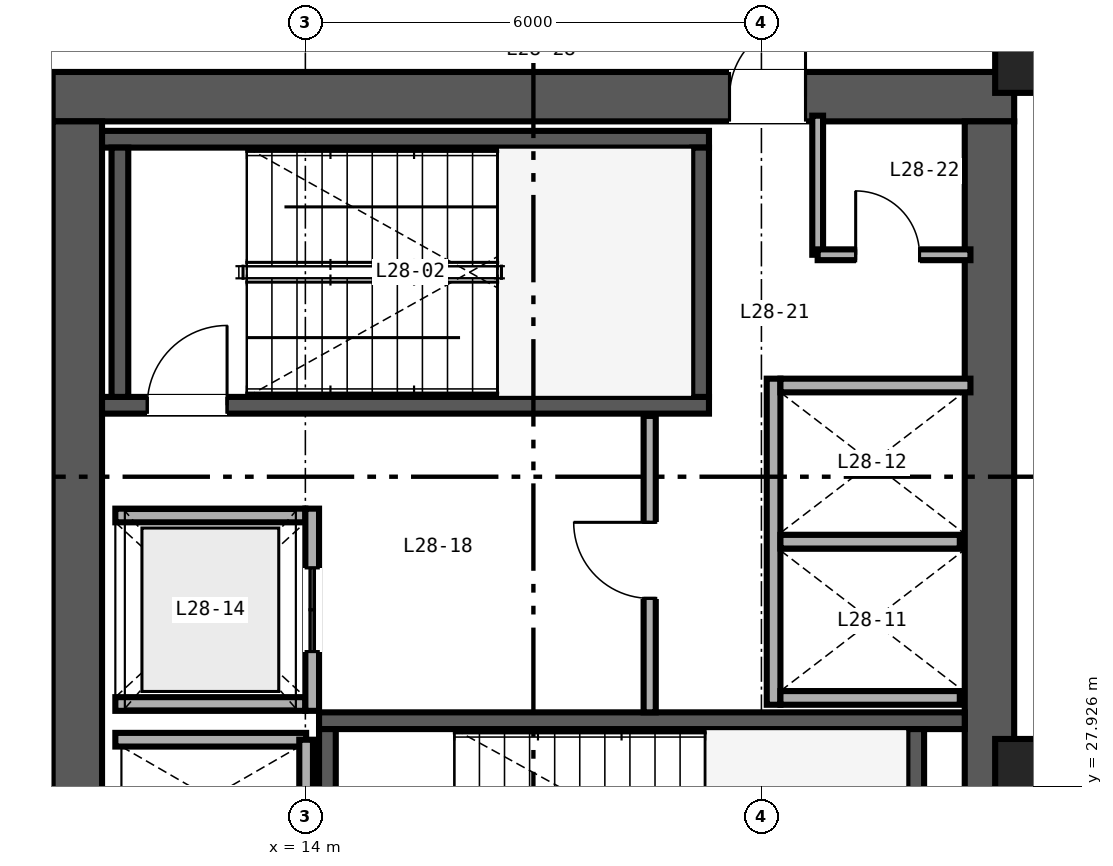
"""IFC4 building model, lengths in metres.
Left out: names, types, materials, properties, quantities, classifications, styles, units other than length and angle.
Written with IfcOpenShell. Run it as: python <this file> out.ifc"""

import sys

from ifc_helpers import new_model, si_unit, direction, frame, frame_2d, origin, origin_2d, place, context, subcontext, project, spatial, rectangle, hollow_rectangle, extrude, source, transform, mapped, element, fill, save


model = new_model("IFC4")
c1 = context("Model", 3, precision=1e-05, world=origin(), true_north=direction((0.0, 1.0)))
c2 = subcontext(c1, "Body", "Model", "MODEL_VIEW")
j1 = project(units=[si_unit("LENGTHUNIT", "METRE"), si_unit("PLANEANGLEUNIT", "RADIAN")], contexts=[c1])
p1 = place(None, origin())
s1 = spatial("IfcSite", under=j1, at=p1, CompositionType="ELEMENT")
p2 = place(p1, origin())
s2 = spatial("IfcBuilding", under=s1, at=p2, CompositionType="ELEMENT")
p3 = place(p2, frame((0.0, 0.0, 115.2)))
s3 = spatial("IfcBuildingStorey", under=s2, at=p3, CompositionType="ELEMENT", Elevation=115.2)
p4 = place(p3, frame((10.675, 37.0, 0.0), z_axis=(0.0, 0.0, 1.0), x_axis=(1.0, 0.0, 0.0)))
e1 = element("IfcWall", 1, at=p4, inside=s3, PredefinedType="SHEAR", context=c2, shape_type="SweptSolid", body=[
    extrude(rectangle(XDim=12.65, YDim=0.65, at=frame_2d((6.325, 0.0))), origin(), (0.0, 0.0, 1.0), 3.36),
])
p5 = place(p4, frame((8.905, 0.0, 0.0)))
e2 = element("IfcOpeningElement", 2, at=p5, cuts=e1, PredefinedType="OPENING", context=c2, shape_type="SweptSolid", body=[
    extrude(rectangle(XDim=1.0, YDim=2.15, at=frame_2d((0.5, 1.075))), frame((0.0, 0.335, 0.0), z_axis=(0.0, -1.0, 0.0), x_axis=(1.0, 0.0, 0.0)), (0.0, 0.0, 1.0), 0.67),
])
for number, where, z_axis, x_axis in (
    (3, (11.0, 15.325, 0.0), (0.0, 0.0, 1.0), (0.0, 1.0, 0.0)),
    (4, (23.0, 15.325, 0.0), (0.0, 0.0, 1.0), (0.0, 1.0, 0.0)),
):
    element("IfcWall", number, at=place(p3, frame(where, z_axis=z_axis, x_axis=x_axis)), inside=s3, PredefinedType="SHEAR", context=c2, shape_type="SweptSolid", body=[
        extrude(rectangle(XDim=21.35, YDim=0.65, at=frame_2d((10.675, 0.0))), origin(), (0.0, 0.0, 1.0), 3.36),
    ])
p6 = place(p3, frame((11.325, 32.94, 0.0), z_axis=(0.0, 0.0, 1.0), x_axis=(1.0, 0.0, 0.0)))
e5 = element("IfcWall", 5, at=p6, inside=s3, PredefinedType="SHEAR", context=c2, shape_type="SweptSolid", body=[
    extrude(rectangle(XDim=7.985, YDim=0.22, at=frame_2d((3.993, 0.0))), origin(), (0.0, 0.0, 1.0), 3.4),
])
p7 = place(p6, frame((0.595, 0.0, 0.0)))
e6 = element("IfcOpeningElement", 6, at=p7, cuts=e5, PredefinedType="OPENING", context=c2, shape_type="SweptSolid", body=[
    extrude(rectangle(XDim=1.05, YDim=2.15, at=frame_2d((0.525, 1.075))), frame((0.0, 0.12, 0.0), z_axis=(0.0, -1.0, 0.0), x_axis=(1.0, 0.0, 0.0)), (0.0, 0.0, 1.0), 0.24),
])
p8 = place(p3, frame((11.325, 36.44, 0.0), z_axis=(0.0, 0.0, 1.0), x_axis=(1.0, 0.0, 0.0)))
e7 = element("IfcWall", 7, at=p8, inside=s3, PredefinedType="SHEAR", context=c2, shape_type="SweptSolid", body=[
    extrude(rectangle(XDim=7.985, YDim=0.22, at=frame_2d((3.993, 0.0))), origin(), (0.0, 0.0, 1.0), 3.4),
])
for number, where, z_axis, x_axis in (
    (8, (11.56, 33.05, 0.0), (0.0, 0.0, 1.0), (0.0, 1.0, 0.0)),
    (9, (19.2, 33.05, 0.0), (0.0, 0.0, 1.0), (0.0, 1.0, 0.0)),
):
    element("IfcWall", number, at=place(p3, frame(where, z_axis=z_axis, x_axis=x_axis)), inside=s3, PredefinedType="SHEAR", context=c2, shape_type="SweptSolid", body=[
        extrude(rectangle(XDim=3.28, YDim=0.22, at=frame_2d((1.64, 0.0))), origin(), (0.0, 0.0, 1.0), 3.4),
    ])
p9 = place(p3, frame((14.18, 28.79, 0.0), z_axis=(0.0, 0.0, 1.0), x_axis=(1.0, 0.0, 0.0)))
e10 = element("IfcWall", 10, at=p9, inside=s3, PredefinedType="SHEAR", context=c2, shape_type="SweptSolid", body=[
    extrude(rectangle(XDim=8.495, YDim=0.22, at=frame_2d((4.248, 0.0))), origin(), (0.0, 0.0, 1.0), 3.4),
])
for number, where, z_axis, x_axis in (
    (11, (14.29, 25.4, 0.0), (0.0, 0.0, 1.0), (0.0, 1.0, 0.0)),
    (12, (22.03, 25.4, 0.0), (0.0, 0.0, 1.0), (0.0, 1.0, 0.0)),
):
    element("IfcWall", number, at=place(p3, frame(where, z_axis=z_axis, x_axis=x_axis)), inside=s3, PredefinedType="SHEAR", context=c2, shape_type="SweptSolid", body=[
        extrude(rectangle(XDim=3.28, YDim=0.22, at=frame_2d((1.64, 0.0))), origin(), (0.0, 0.0, 1.0), 3.4),
    ])
m1 = source(origin(), c2, "Body", "SweptSolid", [
    extrude(hollow_rectangle(XDim=0.85, YDim=0.8, WallThickness=0.032, at=origin_2d()), origin(), (0.0, 0.0, 1.0), 3.36),
])
for number, where, z_axis, x_axis in (
    (13, (23.5, 28.15, 0.0), (0.0, 0.0, 1.0), (1.0, 0.0, 0.0)),
    (14, (23.5, 37.45, 0.0), (0.0, 0.0, 1.0), (1.0, 0.0, 0.0)),
):
    element("IfcColumn", number, at=place(p3, frame(where, z_axis=z_axis, x_axis=x_axis)), inside=s3, PredefinedType="COLUMN", context=c2, shape_type="MappedRepresentation", body=[
        mapped(m1, transform((0.0, 0.0, 0.0), scale=1.0)),
    ])
p10 = place(p3, frame((20.16, 29.0, 0.0), z_axis=(0.0, 0.0, 1.0), x_axis=(0.0, 1.0, 0.0)))
e15 = element("IfcWall", 15, at=p10, inside=s3, PredefinedType="SOLIDWALL", context=c2, shape_type="SweptSolid", body=[
    extrude(rectangle(XDim=4.29, YDim=0.18, at=frame_2d((2.145, 0.0))), origin(), (0.0, 0.0, 1.0), 3.36),
])
p11 = place(p3, frame((20.25, 29.09, 0.0), z_axis=(0.0, 0.0, 1.0), x_axis=(1.0, 0.0, 0.0)))
e16 = element("IfcWall", 16, at=p11, inside=s3, PredefinedType="SOLIDWALL", context=c2, shape_type="SweptSolid", body=[
    extrude(rectangle(XDim=2.36, YDim=0.18, at=frame_2d((1.18, 0.0))), origin(), (0.0, 0.0, 1.0), 3.36),
])
p12 = place(p3, frame((20.25, 33.2, 0.0), z_axis=(0.0, 0.0, 1.0), x_axis=(1.0, 0.0, 0.0)))
e17 = element("IfcWall", 17, at=p12, inside=s3, PredefinedType="SOLIDWALL", context=c2, shape_type="SweptSolid", body=[
    extrude(rectangle(XDim=2.5, YDim=0.18, at=frame_2d((1.25, 0.0))), origin(), (0.0, 0.0, 1.0), 3.36),
])
p13 = place(p3, frame((20.25, 31.145, 0.0), z_axis=(0.0, 0.0, 1.0), x_axis=(1.0, 0.0, 0.0)))
e18 = element("IfcWall", 18, at=p13, inside=s3, PredefinedType="SOLIDWALL", context=c2, shape_type="SweptSolid", body=[
    extrude(rectangle(XDim=2.36, YDim=0.18, at=frame_2d((1.18, 0.0))), origin(), (0.0, 0.0, 1.0), 3.36),
])
for number, where, z_axis, x_axis in (
    (19, (11.5, 29.01, 0.0), (0.0, 0.0, 1.0), (1.0, 0.0, 0.0)),
    (20, (11.5, 31.49, 0.0), (0.0, 0.0, 1.0), (1.0, 0.0, 0.0)),
):
    element("IfcWall", number, at=place(p3, frame(where, z_axis=z_axis, x_axis=x_axis)), inside=s3, PredefinedType="SOLIDWALL", context=c2, shape_type="SweptSolid", body=[
        extrude(rectangle(XDim=2.5, YDim=0.18, at=frame_2d((1.25, 0.0))), origin(), (0.0, 0.0, 1.0), 3.36),
    ])
p14 = place(p3, frame((14.09, 28.92, 0.0), z_axis=(0.0, 0.0, 1.0), x_axis=(0.0, 1.0, 0.0)))
e21 = element("IfcWall", 21, at=p14, inside=s3, PredefinedType="SOLIDWALL", context=c2, shape_type="SweptSolid", body=[
    extrude(rectangle(XDim=2.66, YDim=0.18, at=frame_2d((1.33, 0.0))), origin(), (0.0, 0.0, 1.0), 3.36),
])
p15 = place(p14, frame((0.78, 0.0, 0.0)))
e22 = element("IfcOpeningElement", 22, at=p15, cuts=e21, PredefinedType="OPENING", context=c2, shape_type="SweptSolid", body=[
    extrude(rectangle(XDim=1.1, YDim=2.2, at=frame_2d((0.55, 1.1))), frame((0.0, 0.1, 0.0), z_axis=(0.0, -1.0, 0.0), x_axis=(1.0, 0.0, 0.0)), (0.0, 0.0, 1.0), 0.2),
])
p16 = place(p3, frame((11.5, 28.54, 0.0), z_axis=(0.0, 0.0, 1.0), x_axis=(1.0, 0.0, 0.0)))
e23 = element("IfcWall", 23, at=p16, inside=s3, PredefinedType="SOLIDWALL", context=c2, shape_type="SweptSolid", body=[
    extrude(rectangle(XDim=2.51, YDim=0.18, at=frame_2d((1.255, 0.0))), origin(), (0.0, 0.0, 1.0), 3.36),
])
p17 = place(p3, frame((14.01, 25.46, 0.0), z_axis=(0.0, 0.0, 1.0), x_axis=(0.0, 1.0, 0.0)))
e24 = element("IfcWall", 24, at=p17, inside=s3, PredefinedType="SOLIDWALL", context=c2, shape_type="SweptSolid", body=[
    extrude(rectangle(XDim=3.08, YDim=0.18, at=frame_2d((1.54, 0.0))), origin(), (0.0, 0.0, 1.0), 3.36),
])
p18 = place(p3, frame((18.53, 28.9, 0.0), z_axis=(0.0, 0.0, 1.0), x_axis=(0.0, 1.0, 0.0)))
e25 = element("IfcWall", 25, at=p18, inside=s3, PredefinedType="PARTITIONING", context=c2, shape_type="SweptSolid", body=[
    extrude(rectangle(XDim=3.9, YDim=0.16, at=frame_2d((1.95, 0.0))), origin(), (0.0, 0.0, 1.0), 3.36),
])
p19 = place(p18, frame((1.5, 0.0, 0.0)))
e26 = element("IfcOpeningElement", 26, at=p19, cuts=e25, PredefinedType="OPENING", context=c2, shape_type="SweptSolid", body=[
    extrude(rectangle(XDim=1.0, YDim=2.15, at=frame_2d((0.5, 1.075))), frame((0.0, 0.09, 0.0), z_axis=(0.0, -1.0, 0.0), x_axis=(1.0, 0.0, 0.0)), (0.0, 0.0, 1.0), 0.18),
])
p20 = place(p3, frame((20.74, 34.92, 0.0), z_axis=(0.0, 0.0, 1.0), x_axis=(0.0, 1.0, 0.0)))
e27 = element("IfcWall", 27, at=p20, inside=s3, PredefinedType="PARTITIONING", context=c2, shape_type="SweptSolid", body=[
    extrude(rectangle(XDim=1.83, YDim=0.142, at=frame_2d((0.915, 0.0))), origin(), (0.0, 0.0, 1.0), 3.36),
])
p21 = place(p3, frame((20.74, 34.92, 0.0), z_axis=(0.0, 0.0, 1.0), x_axis=(1.0, 0.0, 0.0)))
e28 = element("IfcWall", 28, at=p21, inside=s3, PredefinedType="PARTITIONING", context=c2, shape_type="SweptSolid", body=[
    extrude(rectangle(XDim=2.01, YDim=0.142, at=frame_2d((1.005, 0.0))), origin(), (0.0, 0.0, 1.0), 3.36),
])
p22 = place(p21, frame((0.5, 0.0, 0.0)))
e29 = element("IfcOpeningElement", 29, at=p22, cuts=e28, PredefinedType="OPENING", context=c2, shape_type="SweptSolid", body=[
    extrude(rectangle(XDim=0.84, YDim=2.1, at=frame_2d((0.42, 1.05))), frame((0.0, 0.081, 0.0), z_axis=(0.0, -1.0, 0.0), x_axis=(1.0, 0.0, 0.0)), (0.0, 0.0, 1.0), 0.162),
])
m2 = source(origin(), c2, "Body", "SweptSolid", [
    extrude(rectangle(XDim=1.05, YDim=2.15, at=frame_2d((0.525, 1.075))), frame((0.0, 0.025, 0.0), z_axis=(0.0, -1.0, 0.0), x_axis=(1.0, 0.0, 0.0)), (0.0, 0.0, 1.0), 0.05),
])
p23 = place(p7, origin())
e30 = element("IfcDoor", 30, at=p23, inside=s3, OperationType="SINGLE_SWING_RIGHT", PredefinedType="DOOR", context=c2, shape_type="MappedRepresentation", body=[
    mapped(m2, transform((0.0, 0.0, 0.0), scale=1.0)),
])
fill(e6, e30)
m3 = source(origin(), c2, "Body", "SweptSolid", [
    extrude(rectangle(XDim=1.1, YDim=2.2, at=frame_2d((0.55, 1.1))), frame((0.0, 0.025, 0.0), z_axis=(0.0, -1.0, 0.0), x_axis=(1.0, 0.0, 0.0)), (0.0, 0.0, 1.0), 0.05),
])
p24 = place(p15, origin())
e31 = element("IfcDoor", 31, at=p24, inside=s3, OperationType="DOUBLE_DOOR_SLIDING", PredefinedType="DOOR", context=c2, shape_type="MappedRepresentation", body=[
    mapped(m3, transform((0.0, 0.0, 0.0), scale=1.0)),
])
fill(e22, e31)
m4 = source(origin(), c2, "Body", "SweptSolid", [
    extrude(rectangle(XDim=1.0, YDim=2.15, at=frame_2d((0.5, 1.075))), frame((0.0, 0.025, 0.0), z_axis=(0.0, -1.0, 0.0), x_axis=(1.0, 0.0, 0.0)), (0.0, 0.0, 1.0), 0.05),
])
p25 = place(p19, origin())
e32 = element("IfcDoor", 32, at=p25, inside=s3, OperationType="SINGLE_SWING_RIGHT", PredefinedType="DOOR", context=c2, shape_type="MappedRepresentation", body=[
    mapped(m4, transform((0.0, 0.0, 0.0), scale=1.0)),
])
fill(e26, e32)
m5 = source(origin(), c2, "Body", "SweptSolid", [
    extrude(rectangle(XDim=0.84, YDim=2.1, at=frame_2d((0.42, 1.05))), frame((0.0, 0.025, 0.0), z_axis=(0.0, -1.0, 0.0), x_axis=(1.0, 0.0, 0.0)), (0.0, 0.0, 1.0), 0.05),
])
p26 = place(p22, origin())
e33 = element("IfcDoor", 33, at=p26, inside=s3, OperationType="SINGLE_SWING_LEFT", PredefinedType="DOOR", context=c2, shape_type="MappedRepresentation", body=[
    mapped(m5, transform((0.0, 0.0, 0.0), scale=1.0)),
])
fill(e29, e33)
p27 = place(p5, origin())
e34 = element("IfcDoor", 34, at=p27, inside=s3, OperationType="SINGLE_SWING_RIGHT", PredefinedType="DOOR", context=c2, shape_type="MappedRepresentation", body=[
    mapped(m4, transform((0.0, 0.0, 0.0), scale=1.0)),
])
fill(e2, e34)
save(model, sys.argv[1])
